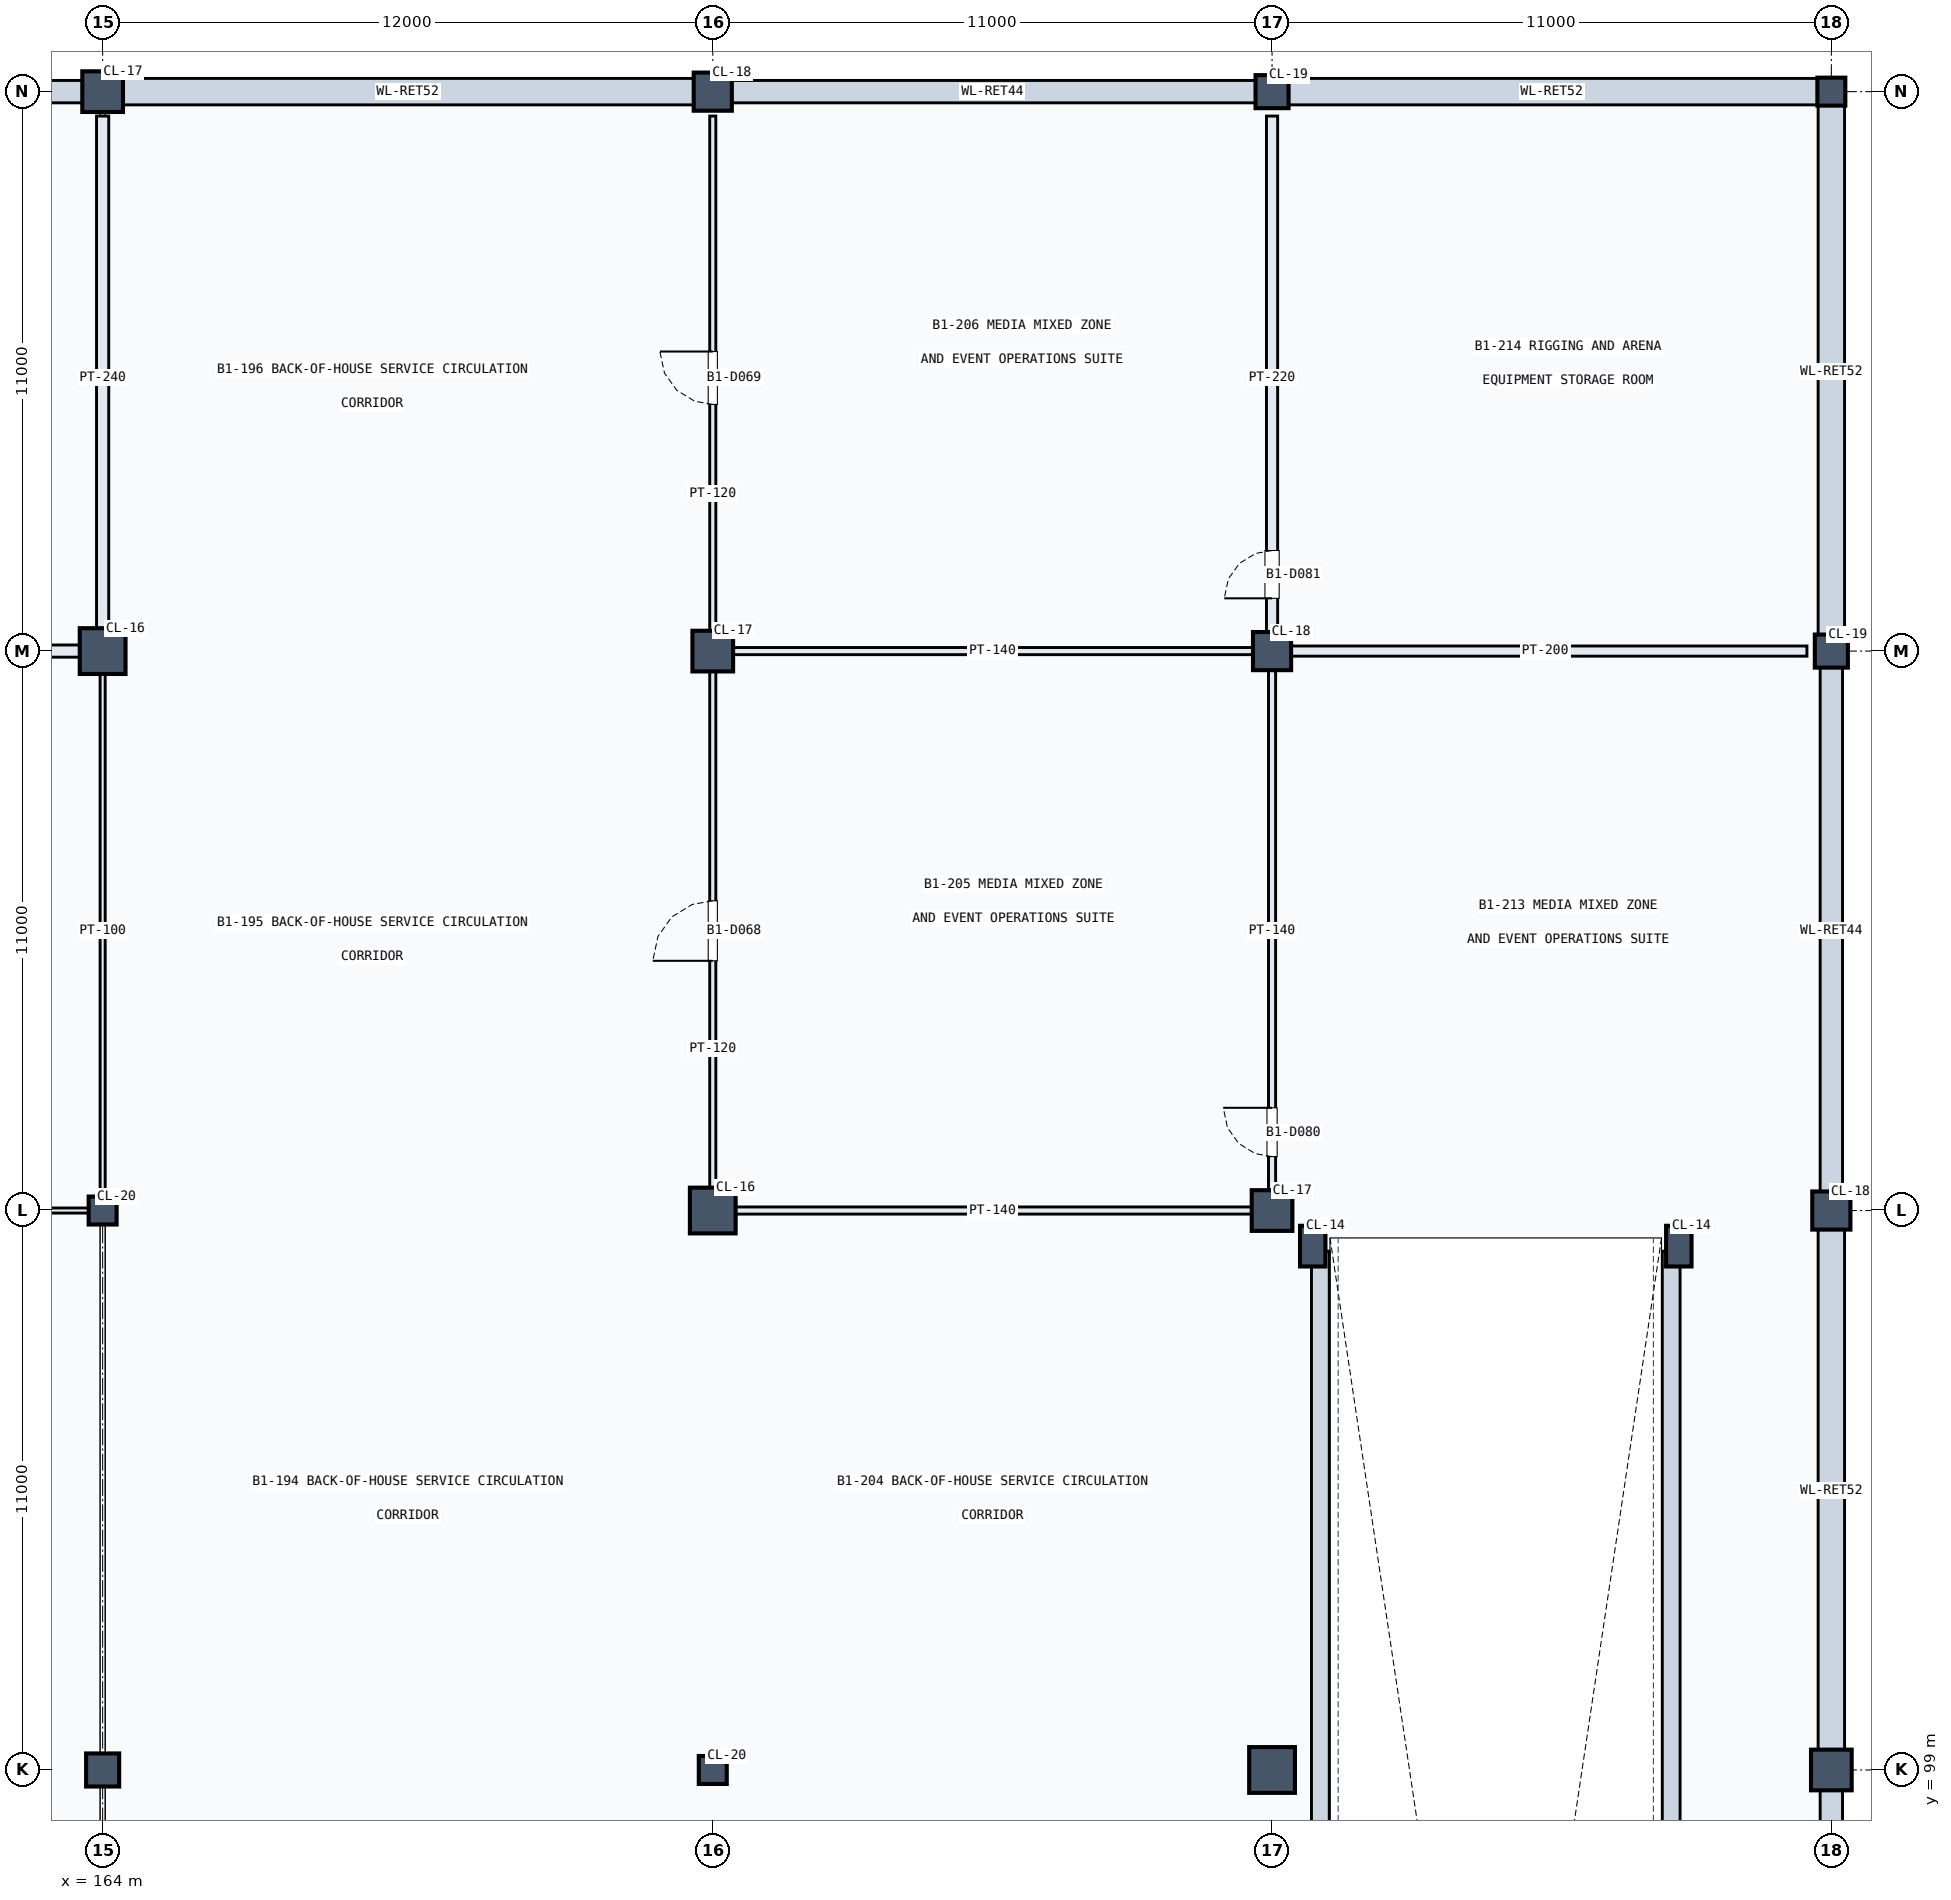
"""IFC4 building model, lengths in metres.
Left out: names, types, materials, properties, quantities, classifications, styles, units other than length and angle.
Written with IfcOpenShell. Run it as: python <this file> out.ifc"""

import sys

from ifc_helpers import new_model, si_unit, direction, frame, frame_2d, origin, origin_2d, place, context, subcontext, project, spatial, rectangle, circle, extrude, element, fill, save


model = new_model("IFC4")
c1 = context("Model", 3, precision=1e-05, world=origin(), true_north=direction((0.0, 1.0)))
c2 = subcontext(c1, "Body", "Model", "MODEL_VIEW")
j1 = project(units=[si_unit("LENGTHUNIT", "METRE"), si_unit("PLANEANGLEUNIT", "RADIAN")], contexts=[c1])
p1 = place(None, origin())
s1 = spatial("IfcSite", under=j1, at=p1, CompositionType="ELEMENT")
p2 = place(p1, origin())
s2 = spatial("IfcBuilding", under=s1, at=p2, CompositionType="ELEMENT")
p3 = place(p2, frame((0.0, 0.0, -5.4)))
s3 = spatial("IfcBuildingStorey", under=s2, at=p3, CompositionType="ELEMENT", Elevation=-5.4)
p4 = place(p3, frame((164.0, 99.0, 0.0), z_axis=(0.0, 0.0, 1.0), x_axis=(1.0, 0.0, 0.0)))
e1 = element("IfcColumn", 1, at=p4, inside=s3, PredefinedType="COLUMN", context=c2, shape_type="SweptSolid", body=[
    extrude(circle(Radius=0.325, at=origin_2d()), origin(), (0.0, 0.0, 1.0), 5.4),
])
p5 = place(p3, frame((164.0, 110.0, 0.0), z_axis=(0.0, 0.0, 1.0), x_axis=(1.0, 0.0, 0.0)))
e2 = element("IfcColumn", 2, at=p5, inside=s3, PredefinedType="COLUMN", context=c2, shape_type="SweptSolid", body=[
    extrude(circle(Radius=0.275, at=origin_2d()), origin(), (0.0, 0.0, 1.0), 5.4),
])
p6 = place(p3, frame((164.0, 121.0, 0.0), z_axis=(0.0, 0.0, 1.0), x_axis=(1.0, 0.0, 0.0)))
e3 = element("IfcColumn", 3, at=p6, inside=s3, PredefinedType="COLUMN", context=c2, shape_type="SweptSolid", body=[
    extrude(circle(Radius=0.45, at=origin_2d()), origin(), (0.0, 0.0, 1.0), 5.4),
])
p7 = place(p3, frame((164.0, 132.0, 0.0), z_axis=(0.0, 0.0, 1.0), x_axis=(1.0, 0.0, 0.0)))
e4 = element("IfcColumn", 4, at=p7, inside=s3, PredefinedType="COLUMN", context=c2, shape_type="SweptSolid", body=[
    extrude(circle(Radius=0.4, at=origin_2d()), origin(), (0.0, 0.0, 1.0), 5.4),
])
p8 = place(p3, frame((176.0, 99.0, 0.0), z_axis=(0.0, 0.0, 1.0), x_axis=(1.0, 0.0, 0.0)))
e5 = element("IfcColumn", 5, at=p8, inside=s3, PredefinedType="COLUMN", context=c2, shape_type="SweptSolid", body=[
    extrude(circle(Radius=0.275, at=origin_2d()), origin(), (0.0, 0.0, 1.0), 5.4),
])
p9 = place(p3, frame((176.0, 110.0, 0.0), z_axis=(0.0, 0.0, 1.0), x_axis=(1.0, 0.0, 0.0)))
e6 = element("IfcColumn", 6, at=p9, inside=s3, PredefinedType="COLUMN", context=c2, shape_type="SweptSolid", body=[
    extrude(circle(Radius=0.45, at=origin_2d()), origin(), (0.0, 0.0, 1.0), 5.4),
])
p10 = place(p3, frame((176.0, 121.0, 0.0), z_axis=(0.0, 0.0, 1.0), x_axis=(1.0, 0.0, 0.0)))
e7 = element("IfcColumn", 7, at=p10, inside=s3, PredefinedType="COLUMN", context=c2, shape_type="SweptSolid", body=[
    extrude(circle(Radius=0.4, at=origin_2d()), origin(), (0.0, 0.0, 1.0), 5.4),
])
p11 = place(p3, frame((176.0, 132.0, 0.0), z_axis=(0.0, 0.0, 1.0), x_axis=(1.0, 0.0, 0.0)))
e8 = element("IfcColumn", 8, at=p11, inside=s3, PredefinedType="COLUMN", context=c2, shape_type="SweptSolid", body=[
    extrude(circle(Radius=0.375, at=origin_2d()), origin(), (0.0, 0.0, 1.0), 5.4),
])
p12 = place(p3, frame((187.0, 99.0, 0.0), z_axis=(0.0, 0.0, 1.0), x_axis=(1.0, 0.0, 0.0)))
e9 = element("IfcColumn", 9, at=p12, inside=s3, PredefinedType="COLUMN", context=c2, shape_type="SweptSolid", body=[
    extrude(circle(Radius=0.45, at=origin_2d()), origin(), (0.0, 0.0, 1.0), 5.4),
])
p13 = place(p3, frame((187.0, 110.0, 0.0), z_axis=(0.0, 0.0, 1.0), x_axis=(1.0, 0.0, 0.0)))
e10 = element("IfcColumn", 10, at=p13, inside=s3, PredefinedType="COLUMN", context=c2, shape_type="SweptSolid", body=[
    extrude(circle(Radius=0.4, at=origin_2d()), origin(), (0.0, 0.0, 1.0), 5.4),
])
p14 = place(p3, frame((187.0, 121.0, 0.0), z_axis=(0.0, 0.0, 1.0), x_axis=(1.0, 0.0, 0.0)))
e11 = element("IfcColumn", 11, at=p14, inside=s3, PredefinedType="COLUMN", context=c2, shape_type="SweptSolid", body=[
    extrude(circle(Radius=0.375, at=origin_2d()), origin(), (0.0, 0.0, 1.0), 5.4),
])
p15 = place(p3, frame((187.0, 132.0, 0.0), z_axis=(0.0, 0.0, 1.0), x_axis=(1.0, 0.0, 0.0)))
e12 = element("IfcColumn", 12, at=p15, inside=s3, PredefinedType="COLUMN", context=c2, shape_type="SweptSolid", body=[
    extrude(circle(Radius=0.325, at=origin_2d()), origin(), (0.0, 0.0, 1.0), 5.4),
])
p16 = place(p3, frame((198.0, 99.0, 0.0), z_axis=(0.0, 0.0, 1.0), x_axis=(1.0, 0.0, 0.0)))
e13 = element("IfcColumn", 13, at=p16, inside=s3, PredefinedType="COLUMN", context=c2, shape_type="SweptSolid", body=[
    extrude(circle(Radius=0.4, at=origin_2d()), origin(), (0.0, 0.0, 1.0), 5.4),
])
p17 = place(p3, frame((198.0, 110.0, 0.0), z_axis=(0.0, 0.0, 1.0), x_axis=(1.0, 0.0, 0.0)))
e14 = element("IfcColumn", 14, at=p17, inside=s3, PredefinedType="COLUMN", context=c2, shape_type="SweptSolid", body=[
    extrude(circle(Radius=0.375, at=origin_2d()), origin(), (0.0, 0.0, 1.0), 5.4),
])
p18 = place(p3, frame((198.0, 121.0, 0.0), z_axis=(0.0, 0.0, 1.0), x_axis=(1.0, 0.0, 0.0)))
e15 = element("IfcColumn", 15, at=p18, inside=s3, PredefinedType="COLUMN", context=c2, shape_type="SweptSolid", body=[
    extrude(circle(Radius=0.325, at=origin_2d()), origin(), (0.0, 0.0, 1.0), 5.4),
])
p19 = place(p3, frame((198.0, 132.0, 0.0), z_axis=(0.0, 0.0, 1.0), x_axis=(1.0, 0.0, 0.0)))
e16 = element("IfcColumn", 16, at=p19, inside=s3, PredefinedType="COLUMN", context=c2, shape_type="SweptSolid", body=[
    extrude(circle(Radius=0.275, at=origin_2d()), origin(), (0.0, 0.0, 1.0), 5.4),
])
for number, where, z_axis, x_axis in (
    (17, (187.8, 109.3, 0.0), (0.0, 0.0, 1.0), (1.0, 0.0, 0.0)),
    (18, (195.0, 109.3, 0.0), (0.0, 0.0, 1.0), (1.0, 0.0, 0.0)),
):
    element("IfcColumn", number, at=place(p3, frame(where, z_axis=z_axis, x_axis=x_axis)), inside=s3, PredefinedType="COLUMN", context=c2, shape_type="SweptSolid", body=[
        extrude(rectangle(XDim=0.5, YDim=0.8, at=origin_2d()), origin(), (0.0, 0.0, 1.0), 5.1),
    ])
p20 = place(p3, frame((152.22, 132.0, 0.0), z_axis=(0.0, 0.0, 1.0), x_axis=(1.0, 0.0, 0.0)))
e19 = element("IfcWall", 19, at=p20, inside=s3, PredefinedType="SOLIDWALL", context=c2, shape_type="SweptSolid", body=[
    extrude(rectangle(XDim=11.56, YDim=0.44, at=frame_2d((5.78, 0.0))), origin(), (0.0, 0.0, 1.0), 4.23),
])
p21 = place(p3, frame((164.22, 132.0, 0.0), z_axis=(0.0, 0.0, 1.0), x_axis=(1.0, 0.0, 0.0)))
e20 = element("IfcWall", 20, at=p21, inside=s3, PredefinedType="SOLIDWALL", context=c2, shape_type="SweptSolid", body=[
    extrude(rectangle(XDim=11.56, YDim=0.52, at=frame_2d((5.78, 0.0))), origin(), (0.0, 0.0, 1.0), 4.418),
])
p22 = place(p3, frame((176.22, 132.0, 0.0), z_axis=(0.0, 0.0, 1.0), x_axis=(1.0, 0.0, 0.0)))
e21 = element("IfcWall", 21, at=p22, inside=s3, PredefinedType="SOLIDWALL", context=c2, shape_type="SweptSolid", body=[
    extrude(rectangle(XDim=10.56, YDim=0.44, at=frame_2d((5.28, 0.0))), origin(), (0.0, 0.0, 1.0), 4.418),
])
p23 = place(p3, frame((198.0, 88.22, 0.0), z_axis=(0.0, 0.0, 1.0), x_axis=(0.0, 1.0, 0.0)))
e22 = element("IfcWall", 22, at=p23, inside=s3, PredefinedType="SOLIDWALL", context=c2, shape_type="SweptSolid", body=[
    extrude(rectangle(XDim=10.56, YDim=0.44, at=frame_2d((5.28, 0.0))), origin(), (0.0, 0.0, 1.0), 4.43),
])
p24 = place(p3, frame((198.0, 99.22, 0.0), z_axis=(0.0, 0.0, 1.0), x_axis=(0.0, 1.0, 0.0)))
e23 = element("IfcWall", 23, at=p24, inside=s3, PredefinedType="SOLIDWALL", context=c2, shape_type="SweptSolid", body=[
    extrude(rectangle(XDim=10.56, YDim=0.52, at=frame_2d((5.28, 0.0))), origin(), (0.0, 0.0, 1.0), 4.13),
])
p25 = place(p3, frame((198.0, 110.22, 0.0), z_axis=(0.0, 0.0, 1.0), x_axis=(0.0, 1.0, 0.0)))
e24 = element("IfcWall", 24, at=p25, inside=s3, PredefinedType="SOLIDWALL", context=c2, shape_type="SweptSolid", body=[
    extrude(rectangle(XDim=10.56, YDim=0.44, at=frame_2d((5.28, 0.0))), origin(), (0.0, 0.0, 1.0), 4.13),
])
p26 = place(p3, frame((187.22, 132.0, 0.0), z_axis=(0.0, 0.0, 1.0), x_axis=(1.0, 0.0, 0.0)))
e25 = element("IfcWall", 25, at=p26, inside=s3, PredefinedType="SOLIDWALL", context=c2, shape_type="SweptSolid", body=[
    extrude(rectangle(XDim=10.56, YDim=0.52, at=frame_2d((5.28, 0.0))), origin(), (0.0, 0.0, 1.0), 4.53),
])
p27 = place(p3, frame((198.0, 121.22, 0.0), z_axis=(0.0, 0.0, 1.0), x_axis=(0.0, 1.0, 0.0)))
e26 = element("IfcWall", 26, at=p27, inside=s3, PredefinedType="SOLIDWALL", context=c2, shape_type="SweptSolid", body=[
    extrude(rectangle(XDim=10.56, YDim=0.52, at=frame_2d((5.28, 0.0))), origin(), (0.0, 0.0, 1.0), 4.23),
])
for number, where, z_axis, x_axis in (
    (27, (187.95, 66.5, 0.0), (0.0, 0.0, 1.0), (0.0, 1.0, 0.0)),
    (28, (194.85, 66.5, 0.0), (0.0, 0.0, 1.0), (0.0, 1.0, 0.0)),
):
    element("IfcWall", number, at=place(p3, frame(where, z_axis=z_axis, x_axis=x_axis)), inside=s3, PredefinedType="SOLIDWALL", context=c2, shape_type="SweptSolid", body=[
        extrude(rectangle(XDim=42.7, YDim=0.35, at=frame_2d((21.35, 0.0))), origin(), (0.0, 0.0, 1.0), 3.88),
    ])
p28 = place(p3, frame((152.22, 110.0, 0.0), z_axis=(0.0, 0.0, 1.0), x_axis=(1.0, 0.0, 0.0)))
e29 = element("IfcWall", 29, at=p28, inside=s3, PredefinedType="PARTITIONING", context=c2, shape_type="SweptSolid", body=[
    extrude(rectangle(XDim=11.56, YDim=0.1, at=frame_2d((5.78, 0.0))), origin(), (0.0, 0.0, 1.0), 4.08),
])
p29 = place(p3, frame((164.0, 110.22, 0.0), z_axis=(0.0, 0.0, 1.0), x_axis=(0.0, 1.0, 0.0)))
e30 = element("IfcWall", 30, at=p29, inside=s3, PredefinedType="PARTITIONING", context=c2, shape_type="SweptSolid", body=[
    extrude(rectangle(XDim=10.56, YDim=0.1, at=frame_2d((5.28, 0.0))), origin(), (0.0, 0.0, 1.0), 4.13),
])
p30 = place(p3, frame((164.0, 121.22, 0.0), z_axis=(0.0, 0.0, 1.0), x_axis=(0.0, 1.0, 0.0)))
e31 = element("IfcWall", 31, at=p30, inside=s3, PredefinedType="PARTITIONING", context=c2, shape_type="SweptSolid", body=[
    extrude(rectangle(XDim=10.3, YDim=0.24, at=frame_2d((5.15, 0.0))), origin(), (0.0, 0.0, 1.0), 4.13),
])
p31 = place(p3, frame((176.0, 110.22, 0.0), z_axis=(0.0, 0.0, 1.0), x_axis=(0.0, 1.0, 0.0)))
e32 = element("IfcWall", 32, at=p31, inside=s3, PredefinedType="PARTITIONING", context=c2, shape_type="SweptSolid", body=[
    extrude(rectangle(XDim=10.56, YDim=0.12, at=frame_2d((5.28, 0.0))), origin(), (0.0, 0.0, 1.0), 4.08),
])
p32 = place(p31, frame((4.69, 0.0, 0.0)))
e33 = element("IfcOpeningElement", 33, at=p32, cuts=e32, PredefinedType="OPENING", context=c2, shape_type="SweptSolid", body=[
    extrude(rectangle(XDim=1.18, YDim=2.15, at=frame_2d((0.59, 1.075))), frame((0.0, 0.07, 0.0), z_axis=(0.0, -1.0, 0.0), x_axis=(1.0, 0.0, 0.0)), (0.0, 0.0, 1.0), 0.14),
])
p33 = place(p3, frame((176.0, 121.22, 0.0), z_axis=(0.0, 0.0, 1.0), x_axis=(0.0, 1.0, 0.0)))
e34 = element("IfcWall", 34, at=p33, inside=s3, PredefinedType="PARTITIONING", context=c2, shape_type="SweptSolid", body=[
    extrude(rectangle(XDim=10.3, YDim=0.12, at=frame_2d((5.15, 0.0))), origin(), (0.0, 0.0, 1.0), 4.08),
])
p34 = place(p33, frame((4.63, 0.0, 0.0)))
e35 = element("IfcOpeningElement", 35, at=p34, cuts=e34, PredefinedType="OPENING", context=c2, shape_type="SweptSolid", body=[
    extrude(rectangle(XDim=1.04, YDim=2.2, at=frame_2d((0.52, 1.1))), frame((0.0, 0.07, 0.0), z_axis=(0.0, -1.0, 0.0), x_axis=(1.0, 0.0, 0.0)), (0.0, 0.0, 1.0), 0.14),
])
p35 = place(p3, frame((176.22, 110.0, 0.0), z_axis=(0.0, 0.0, 1.0), x_axis=(1.0, 0.0, 0.0)))
e36 = element("IfcWall", 36, at=p35, inside=s3, PredefinedType="PARTITIONING", context=c2, shape_type="SweptSolid", body=[
    extrude(rectangle(XDim=10.56, YDim=0.14, at=frame_2d((5.28, 0.0))), origin(), (0.0, 0.0, 1.0), 4.13),
])
p36 = place(p3, frame((152.22, 121.0, 0.0), z_axis=(0.0, 0.0, 1.0), x_axis=(1.0, 0.0, 0.0)))
e37 = element("IfcWall", 37, at=p36, inside=s3, PredefinedType="PARTITIONING", context=c2, shape_type="SweptSolid", body=[
    extrude(rectangle(XDim=11.56, YDim=0.24, at=frame_2d((5.78, 0.0))), origin(), (0.0, 0.0, 1.0), 4.08),
])
p37 = place(p3, frame((176.22, 121.0, 0.0), z_axis=(0.0, 0.0, 1.0), x_axis=(1.0, 0.0, 0.0)))
e38 = element("IfcWall", 38, at=p37, inside=s3, PredefinedType="PARTITIONING", context=c2, shape_type="SweptSolid", body=[
    extrude(rectangle(XDim=10.56, YDim=0.14, at=frame_2d((5.28, 0.0))), origin(), (0.0, 0.0, 1.0), 4.08),
])
p38 = place(p3, frame((187.0, 110.22, 0.0), z_axis=(0.0, 0.0, 1.0), x_axis=(0.0, 1.0, 0.0)))
e39 = element("IfcWall", 39, at=p38, inside=s3, PredefinedType="PARTITIONING", context=c2, shape_type="SweptSolid", body=[
    extrude(rectangle(XDim=10.56, YDim=0.14, at=frame_2d((5.28, 0.0))), origin(), (0.0, 0.0, 1.0), 4.08),
])
p39 = place(p38, frame((0.84, 0.0, 0.0)))
e40 = element("IfcOpeningElement", 40, at=p39, cuts=e39, PredefinedType="OPENING", context=c2, shape_type="SweptSolid", body=[
    extrude(rectangle(XDim=0.96, YDim=2.15, at=frame_2d((0.48, 1.075))), frame((0.0, 0.08, 0.0), z_axis=(0.0, -1.0, 0.0), x_axis=(1.0, 0.0, 0.0)), (0.0, 0.0, 1.0), 0.16),
])
p40 = place(p3, frame((187.0, 121.22, 0.0), z_axis=(0.0, 0.0, 1.0), x_axis=(0.0, 1.0, 0.0)))
e41 = element("IfcWall", 41, at=p40, inside=s3, PredefinedType="PARTITIONING", context=c2, shape_type="SweptSolid", body=[
    extrude(rectangle(XDim=10.3, YDim=0.22, at=frame_2d((5.15, 0.0))), origin(), (0.0, 0.0, 1.0), 4.08),
])
p41 = place(p40, frame((0.817, 0.0, 0.0)))
e42 = element("IfcOpeningElement", 42, at=p41, cuts=e41, PredefinedType="OPENING", context=c2, shape_type="SweptSolid", body=[
    extrude(rectangle(XDim=0.94, YDim=2.15, at=frame_2d((0.47, 1.075))), frame((0.0, 0.12, 0.0), z_axis=(0.0, -1.0, 0.0), x_axis=(1.0, 0.0, 0.0)), (0.0, 0.0, 1.0), 0.24),
])
p42 = place(p3, frame((187.22, 121.0, 0.0), z_axis=(0.0, 0.0, 1.0), x_axis=(1.0, 0.0, 0.0)))
e43 = element("IfcWall", 43, at=p42, inside=s3, PredefinedType="PARTITIONING", context=c2, shape_type="SweptSolid", body=[
    extrude(rectangle(XDim=10.3, YDim=0.2, at=frame_2d((5.15, 0.0))), origin(), (0.0, 0.0, 1.0), 4.08),
])
p43 = place(p32, origin())
e44 = element("IfcDoor", 44, at=p43, inside=s3, OperationType="SINGLE_SWING_LEFT", PredefinedType="DOOR", context=c2, shape_type="SweptSolid", body=[
    extrude(rectangle(XDim=1.18, YDim=2.15, at=frame_2d((0.59, 1.075))), frame((0.0, 0.025, 0.0), z_axis=(0.0, -1.0, 0.0), x_axis=(1.0, 0.0, 0.0)), (0.0, 0.0, 1.0), 0.05),
])
fill(e33, e44)
p44 = place(p34, origin())
e45 = element("IfcDoor", 45, at=p44, inside=s3, OperationType="SINGLE_SWING_RIGHT", PredefinedType="DOOR", context=c2, shape_type="SweptSolid", body=[
    extrude(rectangle(XDim=1.04, YDim=2.2, at=frame_2d((0.52, 1.1))), frame((0.0, 0.025, 0.0), z_axis=(0.0, -1.0, 0.0), x_axis=(1.0, 0.0, 0.0)), (0.0, 0.0, 1.0), 0.05),
])
fill(e35, e45)
p45 = place(p39, origin())
e46 = element("IfcDoor", 46, at=p45, inside=s3, OperationType="SINGLE_SWING_RIGHT", PredefinedType="DOOR", context=c2, shape_type="SweptSolid", body=[
    extrude(rectangle(XDim=0.96, YDim=2.15, at=frame_2d((0.48, 1.075))), frame((0.0, 0.025, 0.0), z_axis=(0.0, -1.0, 0.0), x_axis=(1.0, 0.0, 0.0)), (0.0, 0.0, 1.0), 0.05),
])
fill(e40, e46)
p46 = place(p41, origin())
e47 = element("IfcDoor", 47, at=p46, inside=s3, OperationType="SINGLE_SWING_LEFT", PredefinedType="DOOR", context=c2, shape_type="SweptSolid", body=[
    extrude(rectangle(XDim=0.94, YDim=2.15, at=frame_2d((0.47, 1.075))), frame((0.0, 0.025, 0.0), z_axis=(0.0, -1.0, 0.0), x_axis=(1.0, 0.0, 0.0)), (0.0, 0.0, 1.0), 0.05),
])
fill(e42, e47)
save(model, sys.argv[1])
